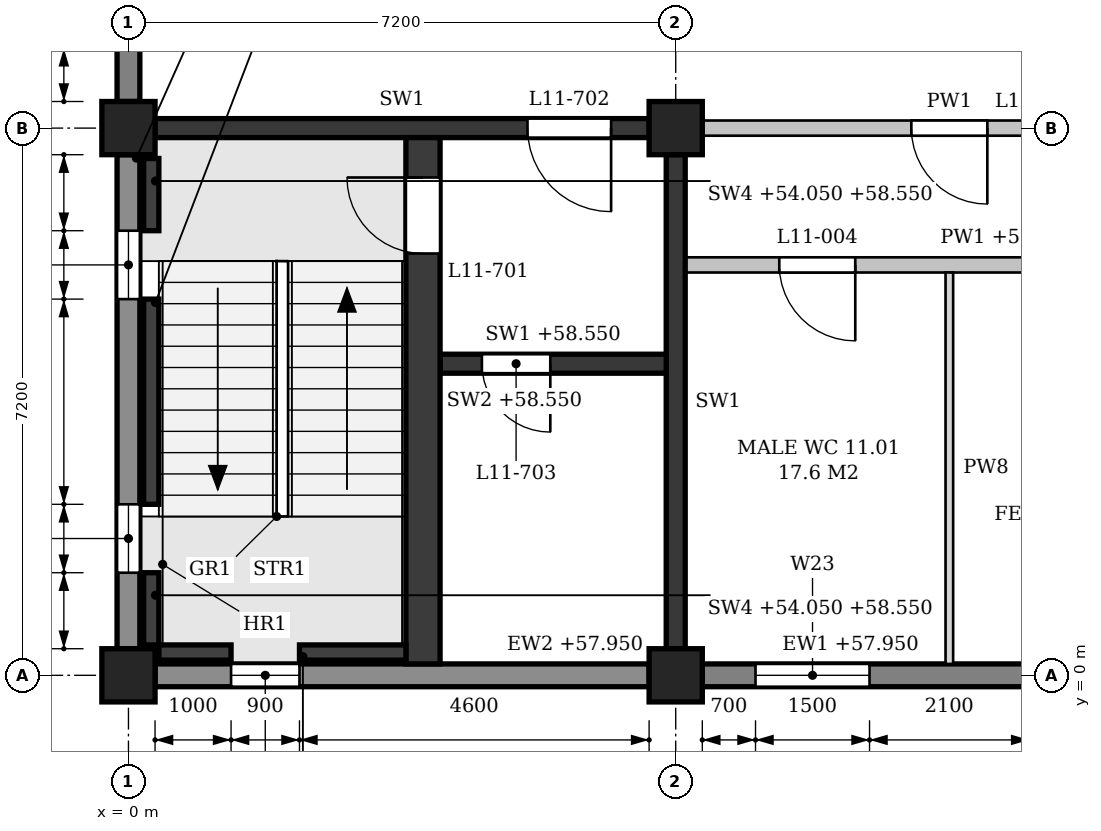
"""IFC4 building model, lengths in metres.
Left out: names, types, materials, properties, quantities, classifications, styles, units other than length and angle.
Written with IfcOpenShell. Run it as: python <this file> out.ifc"""

import sys

from ifc_helpers import new_model, si_unit, direction, frame, frame_2d, origin, origin_2d, place, context, subcontext, project, spatial, polyline, rectangle, outline, extrude, element, fill, save


model = new_model("IFC4")
c1 = context("Model", 3, precision=1e-05, world=origin(), true_north=direction((0.0, 1.0)))
c2 = subcontext(c1, "Body", "Model", "MODEL_VIEW")
j1 = project(units=[si_unit("LENGTHUNIT", "METRE"), si_unit("PLANEANGLEUNIT", "RADIAN")], contexts=[c1])
p1 = place(None, origin())
s1 = spatial("IfcSite", under=j1, at=p1, CompositionType="ELEMENT")
p2 = place(p1, origin())
s2 = spatial("IfcBuilding", under=s1, at=p2, CompositionType="ELEMENT")
p3 = place(p2, frame((0.0, 0.0, 54.3)))
s3 = spatial("IfcBuildingStorey", under=s2, at=p3, CompositionType="ELEMENT", Elevation=54.3)
for number, where, z_axis, x_axis in (
    (1, (0.0, 0.0, 0.0), (0.0, 0.0, 1.0), (1.0, 0.0, 0.0)),
    (2, (0.0, 7.2, 0.0), (0.0, 0.0, 1.0), (1.0, 0.0, 0.0)),
    (3, (7.2, 0.0, 0.0), (0.0, 0.0, 1.0), (1.0, 0.0, 0.0)),
    (4, (7.2, 7.2, 0.0), (0.0, 0.0, 1.0), (1.0, 0.0, 0.0)),
):
    element("IfcColumn", number, at=place(p3, frame(where, z_axis=z_axis, x_axis=x_axis)), inside=s3, PredefinedType="COLUMN", context=c2, shape_type="SweptSolid", body=[
        extrude(rectangle(XDim=0.7, YDim=0.7, at=origin_2d()), origin(), (0.0, 0.0, 1.0), 4.5),
    ])
p4 = place(p3, frame((0.0, 0.35, 0.0), z_axis=(0.0, 0.0, 1.0), x_axis=(0.0, 1.0, 0.0)))
e5 = element("IfcWall", 5, at=p4, inside=s3, PredefinedType="STANDARD", context=c2, shape_type="SweptSolid", body=[
    extrude(rectangle(XDim=6.5, YDim=0.3, at=frame_2d((3.25, 0.0))), origin(), (0.0, 0.0, 1.0), 3.65),
])
p5 = place(p4, frame((1.0, 0.0, 0.9)))
e6 = element("IfcOpeningElement", 6, at=p5, cuts=e5, PredefinedType="OPENING", context=c2, shape_type="SweptSolid", body=[
    extrude(outline(polyline([(0.0, 0.0), (0.9, 0.0), (0.9, 2.25), (0.45, 2.7), (0.0, 2.25), (0.0, 0.0)])), frame((0.0, 0.16, 0.0), z_axis=(0.0, -1.0, 0.0), x_axis=(1.0, 0.0, 0.0)), (0.0, 0.0, 1.0), 0.32),
])
p6 = place(p4, frame((4.6, 0.0, 0.9)))
e7 = element("IfcOpeningElement", 7, at=p6, cuts=e5, PredefinedType="OPENING", context=c2, shape_type="SweptSolid", body=[
    extrude(outline(polyline([(0.0, 0.0), (0.9, 0.0), (0.9, 2.25), (0.45, 2.7), (0.0, 2.25), (0.0, 0.0)])), frame((0.0, 0.16, 0.0), z_axis=(0.0, -1.0, 0.0), x_axis=(1.0, 0.0, 0.0)), (0.0, 0.0, 1.0), 0.32),
])
p7 = place(p3, frame((0.0, 7.55, 0.0), z_axis=(0.0, 0.0, 1.0), x_axis=(0.0, 1.0, 0.0)))
e8 = element("IfcWall", 8, at=p7, inside=s3, PredefinedType="STANDARD", context=c2, shape_type="SweptSolid", body=[
    extrude(rectangle(XDim=6.5, YDim=0.3, at=frame_2d((3.25, 0.0))), origin(), (0.0, 0.0, 1.0), 3.65),
])
p8 = place(p7, frame((0.7, 0.0, 0.9)))
e9 = element("IfcOpeningElement", 9, at=p8, cuts=e8, PredefinedType="OPENING", context=c2, shape_type="SweptSolid", body=[
    extrude(outline(polyline([(0.0, 0.0), (1.5, 0.0), (1.5, 1.95), (0.75, 2.7), (0.0, 1.95), (0.0, 0.0)])), frame((0.0, 0.16, 0.0), z_axis=(0.0, -1.0, 0.0), x_axis=(1.0, 0.0, 0.0)), (0.0, 0.0, 1.0), 0.32),
])
p9 = place(p7, frame((4.3, 0.0, 0.9)))
e10 = element("IfcOpeningElement", 10, at=p9, cuts=e8, PredefinedType="OPENING", context=c2, shape_type="SweptSolid", body=[
    extrude(outline(polyline([(0.0, 0.0), (1.5, 0.0), (1.5, 1.95), (0.75, 2.7), (0.0, 1.95), (0.0, 0.0)])), frame((0.0, 0.16, 0.0), z_axis=(0.0, -1.0, 0.0), x_axis=(1.0, 0.0, 0.0)), (0.0, 0.0, 1.0), 0.32),
])
p10 = place(p3, frame((0.35, 0.0, 0.0), z_axis=(0.0, 0.0, 1.0), x_axis=(1.0, 0.0, 0.0)))
e11 = element("IfcWall", 11, at=p10, inside=s3, PredefinedType="STANDARD", context=c2, shape_type="SweptSolid", body=[
    extrude(rectangle(XDim=6.5, YDim=0.3, at=frame_2d((3.25, 0.0))), origin(), (0.0, 0.0, 1.0), 3.65),
])
p11 = place(p10, frame((1.0, 0.0, 0.9)))
e12 = element("IfcOpeningElement", 12, at=p11, cuts=e11, PredefinedType="OPENING", context=c2, shape_type="SweptSolid", body=[
    extrude(outline(polyline([(0.0, 0.0), (0.9, 0.0), (0.9, 2.25), (0.45, 2.7), (0.0, 2.25), (0.0, 0.0)])), frame((0.0, 0.16, 0.0), z_axis=(0.0, -1.0, 0.0), x_axis=(1.0, 0.0, 0.0)), (0.0, 0.0, 1.0), 0.32),
])
p12 = place(p3, frame((7.55, 0.0, 0.0), z_axis=(0.0, 0.0, 1.0), x_axis=(1.0, 0.0, 0.0)))
e13 = element("IfcWall", 13, at=p12, inside=s3, PredefinedType="STANDARD", context=c2, shape_type="SweptSolid", body=[
    extrude(rectangle(XDim=6.5, YDim=0.3, at=frame_2d((3.25, 0.0))), origin(), (0.0, 0.0, 1.0), 3.65),
])
p13 = place(p12, frame((0.7, 0.0, 0.9)))
e14 = element("IfcOpeningElement", 14, at=p13, cuts=e13, PredefinedType="OPENING", context=c2, shape_type="SweptSolid", body=[
    extrude(outline(polyline([(0.0, 0.0), (1.5, 0.0), (1.5, 1.95), (0.75, 2.7), (0.0, 1.95), (0.0, 0.0)])), frame((0.0, 0.16, 0.0), z_axis=(0.0, -1.0, 0.0), x_axis=(1.0, 0.0, 0.0)), (0.0, 0.0, 1.0), 0.32),
])
p14 = place(p12, frame((4.3, 0.0, 0.9)))
e15 = element("IfcOpeningElement", 15, at=p14, cuts=e13, PredefinedType="OPENING", context=c2, shape_type="SweptSolid", body=[
    extrude(outline(polyline([(0.0, 0.0), (1.5, 0.0), (1.5, 1.95), (0.75, 2.7), (0.0, 1.95), (0.0, 0.0)])), frame((0.0, 0.16, 0.0), z_axis=(0.0, -1.0, 0.0), x_axis=(1.0, 0.0, 0.0)), (0.0, 0.0, 1.0), 0.32),
])
p15 = place(p3, frame((0.35, 7.2, 0.0), z_axis=(0.0, 0.0, 1.0), x_axis=(1.0, 0.0, 0.0)))
e16 = element("IfcWall", 16, at=p15, inside=s3, PredefinedType="SHEAR", context=c2, shape_type="SweptSolid", body=[
    extrude(rectangle(XDim=6.5, YDim=0.25, at=frame_2d((3.25, 0.0))), origin(), (0.0, 0.0, 1.0), 3.55),
])
p16 = place(p15, frame((4.9, 0.0, 0.0)))
e17 = element("IfcOpeningElement", 17, at=p16, cuts=e16, PredefinedType="OPENING", context=c2, shape_type="SweptSolid", body=[
    extrude(rectangle(XDim=1.1, YDim=2.1, at=frame_2d((0.55, 1.05))), frame((0.0, 0.135, 0.0), z_axis=(0.0, -1.0, 0.0), x_axis=(1.0, 0.0, 0.0)), (0.0, 0.0, 1.0), 0.27),
])
p17 = place(p3, frame((7.2, 0.35, 0.0), z_axis=(0.0, 0.0, 1.0), x_axis=(0.0, 1.0, 0.0)))
e18 = element("IfcWall", 18, at=p17, inside=s3, PredefinedType="SHEAR", context=c2, shape_type="SweptSolid", body=[
    extrude(rectangle(XDim=6.5, YDim=0.25, at=frame_2d((3.25, 0.0))), origin(), (0.0, 0.0, 1.0), 3.55),
])
p18 = place(p3, frame((0.3, 0.4, -0.25), z_axis=(0.0, 0.0, 1.0), x_axis=(0.0, 1.0, 0.0)))
e19 = element("IfcWall", 19, at=p18, inside=s3, PredefinedType="SHEAR", context=c2, shape_type="SweptSolid", body=[
    extrude(rectangle(XDim=0.95, YDim=0.2, at=frame_2d((0.475, 0.0))), origin(), (0.0, 0.0, 1.0), 4.5),
])
p19 = place(p3, frame((0.3, 2.25, -0.25), z_axis=(0.0, 0.0, 1.0), x_axis=(0.0, 1.0, 0.0)))
e20 = element("IfcWall", 20, at=p19, inside=s3, PredefinedType="SHEAR", context=c2, shape_type="SweptSolid", body=[
    extrude(rectangle(XDim=2.7, YDim=0.2, at=frame_2d((1.35, 0.0))), origin(), (0.0, 0.0, 1.0), 4.5),
])
p20 = place(p3, frame((0.3, 5.85, -0.25), z_axis=(0.0, 0.0, 1.0), x_axis=(0.0, 1.0, 0.0)))
e21 = element("IfcWall", 21, at=p20, inside=s3, PredefinedType="SHEAR", context=c2, shape_type="SweptSolid", body=[
    extrude(rectangle(XDim=0.95, YDim=0.2, at=frame_2d((0.475, 0.0))), origin(), (0.0, 0.0, 1.0), 4.5),
])
p21 = place(p3, frame((0.4, 0.3, -0.25), z_axis=(0.0, 0.0, 1.0), x_axis=(1.0, 0.0, 0.0)))
e22 = element("IfcWall", 22, at=p21, inside=s3, PredefinedType="SHEAR", context=c2, shape_type="SweptSolid", body=[
    extrude(rectangle(XDim=0.95, YDim=0.2, at=frame_2d((0.475, 0.0))), origin(), (0.0, 0.0, 1.0), 4.5),
])
p22 = place(p3, frame((2.25, 0.3, -0.25), z_axis=(0.0, 0.0, 1.0), x_axis=(1.0, 0.0, 0.0)))
e23 = element("IfcWall", 23, at=p22, inside=s3, PredefinedType="SHEAR", context=c2, shape_type="SweptSolid", body=[
    extrude(rectangle(XDim=1.4, YDim=0.2, at=frame_2d((0.7, 0.0))), origin(), (0.0, 0.0, 1.0), 4.5),
])
p23 = place(p3, frame((3.875, 0.15, 0.0), z_axis=(0.0, 0.0, 1.0), x_axis=(0.0, 1.0, 0.0)))
e24 = element("IfcWall", 24, at=p23, inside=s3, PredefinedType="SHEAR", context=c2, shape_type="SweptSolid", body=[
    extrude(rectangle(XDim=6.925, YDim=0.45, at=frame_2d((3.462, 0.0))), origin(), (0.0, 0.0, 1.0), 4.25),
])
p24 = place(p23, frame((5.4, 0.0, 0.0)))
e25 = element("IfcOpeningElement", 25, at=p24, cuts=e24, PredefinedType="OPENING", context=c2, shape_type="SweptSolid", body=[
    extrude(rectangle(XDim=1.0, YDim=2.1, at=frame_2d((0.5, 1.05))), frame((0.0, 0.235, 0.0), z_axis=(0.0, -1.0, 0.0), x_axis=(1.0, 0.0, 0.0)), (0.0, 0.0, 1.0), 0.47),
])
p25 = place(p3, frame((4.1, 4.1, 0.0), z_axis=(0.0, 0.0, 1.0), x_axis=(1.0, 0.0, 0.0)))
e26 = element("IfcWall", 26, at=p25, inside=s3, PredefinedType="SHEAR", context=c2, shape_type="SweptSolid", body=[
    extrude(rectangle(XDim=2.975, YDim=0.25, at=frame_2d((1.487, 0.0))), origin(), (0.0, 0.0, 1.0), 4.25),
])
p26 = place(p25, frame((0.55, 0.0, 0.0)))
e27 = element("IfcOpeningElement", 27, at=p26, cuts=e26, PredefinedType="OPENING", context=c2, shape_type="SweptSolid", body=[
    extrude(rectangle(XDim=0.9, YDim=2.1, at=frame_2d((0.45, 1.05))), frame((0.0, 0.135, 0.0), z_axis=(0.0, -1.0, 0.0), x_axis=(1.0, 0.0, 0.0)), (0.0, 0.0, 1.0), 0.27),
])
p27 = place(p3, frame((7.325, 5.4, 0.0), z_axis=(0.0, 0.0, 1.0), x_axis=(1.0, 0.0, 0.0)))
e28 = element("IfcWall", 28, at=p27, inside=s3, PredefinedType="PARTITIONING", context=c2, shape_type="SweptSolid", body=[
    extrude(outline(polyline([(0.0, 0.0), (14.15, 0.0), (14.15, 3.55), (14.05, 3.55), (14.05, 4.25), (7.3, 4.25), (7.3, 3.55), (6.85, 3.55), (6.85, 4.25), (0.1, 4.25), (0.1, 3.55), (0.0, 3.55), (0.0, 0.0)])), frame((0.0, 0.1, 0.0), z_axis=(0.0, -1.0, 0.0), x_axis=(1.0, 0.0, 0.0)), (0.0, 0.0, 1.0), 0.2),
])
p28 = place(p27, frame((1.238, 0.0, 0.0)))
e29 = element("IfcOpeningElement", 29, at=p28, cuts=e28, PredefinedType="OPENING", context=c2, shape_type="SweptSolid", body=[
    extrude(rectangle(XDim=1.0, YDim=2.1, at=frame_2d((0.5, 1.05))), frame((0.0, 0.11, 0.0), z_axis=(0.0, -1.0, 0.0), x_axis=(1.0, 0.0, 0.0)), (0.0, 0.0, 1.0), 0.22),
])
p29 = place(p27, frame((4.775, 0.0, 0.0)))
e30 = element("IfcOpeningElement", 30, at=p29, cuts=e28, PredefinedType="OPENING", context=c2, shape_type="SweptSolid", body=[
    extrude(rectangle(XDim=1.0, YDim=2.1, at=frame_2d((0.5, 1.05))), frame((0.0, 0.11, 0.0), z_axis=(0.0, -1.0, 0.0), x_axis=(1.0, 0.0, 0.0)), (0.0, 0.0, 1.0), 0.22),
])
p30 = place(p27, frame((8.375, 0.0, 0.0)))
e31 = element("IfcOpeningElement", 31, at=p30, cuts=e28, PredefinedType="OPENING", context=c2, shape_type="SweptSolid", body=[
    extrude(rectangle(XDim=1.0, YDim=2.1, at=frame_2d((0.5, 1.05))), frame((0.0, 0.11, 0.0), z_axis=(0.0, -1.0, 0.0), x_axis=(1.0, 0.0, 0.0)), (0.0, 0.0, 1.0), 0.22),
])
p31 = place(p27, frame((11.913, 0.0, 0.0)))
e32 = element("IfcOpeningElement", 32, at=p31, cuts=e28, PredefinedType="OPENING", context=c2, shape_type="SweptSolid", body=[
    extrude(rectangle(XDim=1.0, YDim=2.1, at=frame_2d((0.5, 1.05))), frame((0.0, 0.11, 0.0), z_axis=(0.0, -1.0, 0.0), x_axis=(1.0, 0.0, 0.0)), (0.0, 0.0, 1.0), 0.22),
])
p32 = place(p3, frame((7.55, 7.2, 0.0), z_axis=(0.0, 0.0, 1.0), x_axis=(1.0, 0.0, 0.0)))
e33 = element("IfcWall", 33, at=p32, inside=s3, PredefinedType="PARTITIONING", context=c2, shape_type="SweptSolid", body=[
    extrude(rectangle(XDim=6.5, YDim=0.2, at=frame_2d((3.25, 0.0))), origin(), (0.0, 0.0, 1.0), 3.55),
])
p33 = place(p32, frame((2.75, 0.0, 0.0)))
e34 = element("IfcOpeningElement", 34, at=p33, cuts=e33, PredefinedType="OPENING", context=c2, shape_type="SweptSolid", body=[
    extrude(rectangle(XDim=1.0, YDim=2.1, at=frame_2d((0.5, 1.05))), frame((0.0, 0.11, 0.0), z_axis=(0.0, -1.0, 0.0), x_axis=(1.0, 0.0, 0.0)), (0.0, 0.0, 1.0), 0.22),
])
p34 = place(p3, frame((10.8, 0.15, 0.0), z_axis=(0.0, 0.0, 1.0), x_axis=(0.0, 1.0, 0.0)))
e35 = element("IfcWall", 35, at=p34, inside=s3, PredefinedType="PARTITIONING", context=c2, shape_type="SweptSolid", body=[
    extrude(rectangle(XDim=5.15, YDim=0.1, at=frame_2d((2.575, 0.0))), origin(), (0.0, 0.0, 1.0), 3.55),
])
p35 = place(p11, origin())
e36 = element("IfcWindow", 36, at=p35, inside=s3, PartitioningType="SINGLE_PANEL", PredefinedType="WINDOW", context=c2, shape_type="SweptSolid", body=[
    extrude(outline(polyline([(0.0, 0.0), (0.9, 0.0), (0.9, 2.25), (0.45, 2.7), (0.0, 2.25), (0.0, 0.0)])), frame((0.0, 0.03, 0.0), z_axis=(0.0, -1.0, 0.0), x_axis=(1.0, 0.0, 0.0)), (0.0, 0.0, 1.0), 0.06),
])
fill(e12, e36)
p36 = place(p13, origin())
e37 = element("IfcWindow", 37, at=p36, inside=s3, PartitioningType="SINGLE_PANEL", PredefinedType="WINDOW", context=c2, shape_type="SweptSolid", body=[
    extrude(outline(polyline([(0.0, 0.0), (1.5, 0.0), (1.5, 1.95), (0.75, 2.7), (0.0, 1.95), (0.0, 0.0)])), frame((0.0, 0.03, 0.0), z_axis=(0.0, -1.0, 0.0), x_axis=(1.0, 0.0, 0.0)), (0.0, 0.0, 1.0), 0.06),
])
fill(e14, e37)
p37 = place(p5, origin())
e38 = element("IfcWindow", 38, at=p37, inside=s3, PartitioningType="SINGLE_PANEL", PredefinedType="WINDOW", context=c2, shape_type="SweptSolid", body=[
    extrude(outline(polyline([(0.0, 0.0), (0.9, 0.0), (0.9, 2.25), (0.45, 2.7), (0.0, 2.25), (0.0, 0.0)])), frame((0.0, 0.03, 0.0), z_axis=(0.0, -1.0, 0.0), x_axis=(1.0, 0.0, 0.0)), (0.0, 0.0, 1.0), 0.06),
])
fill(e6, e38)
p38 = place(p6, origin())
e39 = element("IfcWindow", 39, at=p38, inside=s3, PartitioningType="SINGLE_PANEL", PredefinedType="WINDOW", context=c2, shape_type="SweptSolid", body=[
    extrude(outline(polyline([(0.0, 0.0), (0.9, 0.0), (0.9, 2.25), (0.45, 2.7), (0.0, 2.25), (0.0, 0.0)])), frame((0.0, 0.03, 0.0), z_axis=(0.0, -1.0, 0.0), x_axis=(1.0, 0.0, 0.0)), (0.0, 0.0, 1.0), 0.06),
])
fill(e7, e39)
p39 = place(p24, origin())
e40 = element("IfcDoor", 40, at=p39, inside=s3, OperationType="SINGLE_SWING_RIGHT", PredefinedType="DOOR", context=c2, shape_type="SweptSolid", body=[
    extrude(rectangle(XDim=1.0, YDim=2.1, at=frame_2d((0.5, 1.05))), frame((0.0, 0.025, 0.0), z_axis=(0.0, -1.0, 0.0), x_axis=(1.0, 0.0, 0.0)), (0.0, 0.0, 1.0), 0.05),
])
fill(e25, e40)
p40 = place(p16, frame((1.1, 0.0, 0.0), z_axis=(0.0, 0.0, 1.0), x_axis=(-1.0, 0.0, 0.0)))
e41 = element("IfcDoor", 41, at=p40, inside=s3, OperationType="SINGLE_SWING_LEFT", PredefinedType="DOOR", context=c2, shape_type="SweptSolid", body=[
    extrude(rectangle(XDim=1.1, YDim=2.1, at=frame_2d((0.55, 1.05))), frame((0.0, 0.025, 0.0), z_axis=(0.0, -1.0, 0.0), x_axis=(1.0, 0.0, 0.0)), (0.0, 0.0, 1.0), 0.05),
])
fill(e17, e41)
p41 = place(p26, frame((0.9, 0.0, 0.0), z_axis=(0.0, 0.0, 1.0), x_axis=(-1.0, 0.0, 0.0)))
e42 = element("IfcDoor", 42, at=p41, inside=s3, OperationType="SINGLE_SWING_LEFT", PredefinedType="DOOR", context=c2, shape_type="SweptSolid", body=[
    extrude(rectangle(XDim=0.9, YDim=2.1, at=frame_2d((0.45, 1.05))), frame((0.0, 0.025, 0.0), z_axis=(0.0, -1.0, 0.0), x_axis=(1.0, 0.0, 0.0)), (0.0, 0.0, 1.0), 0.05),
])
fill(e27, e42)
p42 = place(p33, frame((1.0, 0.0, 0.0), z_axis=(0.0, 0.0, 1.0), x_axis=(-1.0, 0.0, 0.0)))
e43 = element("IfcDoor", 43, at=p42, inside=s3, OperationType="SINGLE_SWING_LEFT", PredefinedType="DOOR", context=c2, shape_type="SweptSolid", body=[
    extrude(rectangle(XDim=1.0, YDim=2.1, at=frame_2d((0.5, 1.05))), frame((0.0, 0.025, 0.0), z_axis=(0.0, -1.0, 0.0), x_axis=(1.0, 0.0, 0.0)), (0.0, 0.0, 1.0), 0.05),
])
fill(e34, e43)
p43 = place(p28, frame((1.0, 0.0, 0.0), z_axis=(0.0, 0.0, 1.0), x_axis=(-1.0, 0.0, 0.0)))
e44 = element("IfcDoor", 44, at=p43, inside=s3, OperationType="SINGLE_SWING_LEFT", PredefinedType="DOOR", context=c2, shape_type="SweptSolid", body=[
    extrude(rectangle(XDim=1.0, YDim=2.1, at=frame_2d((0.5, 1.05))), frame((0.0, 0.025, 0.0), z_axis=(0.0, -1.0, 0.0), x_axis=(1.0, 0.0, 0.0)), (0.0, 0.0, 1.0), 0.05),
])
fill(e29, e44)
save(model, sys.argv[1])
